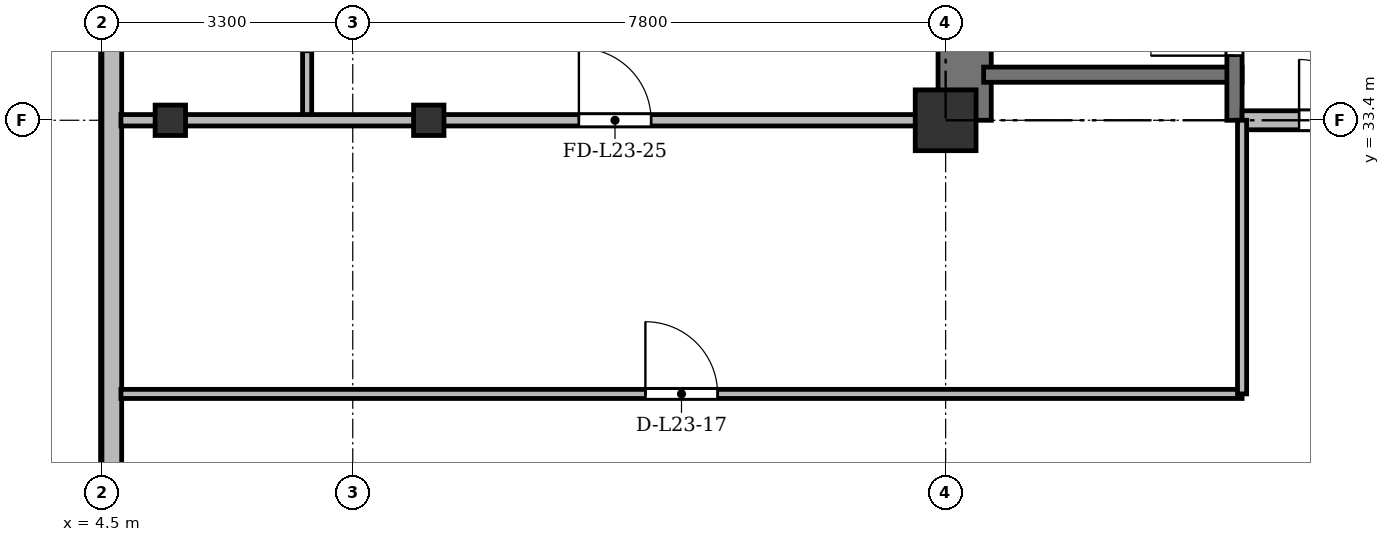
"""IFC4 building model, lengths in metres.
Left out: names, types, materials, properties, quantities, classifications, styles, units other than length and angle.
Written with IfcOpenShell. Run it as: python <this file> out.ifc"""

import sys

from ifc_helpers import new_model, si_unit, direction, frame, frame_2d, origin, origin_2d, place, context, subcontext, project, spatial, rectangle, i_section, extrude, source, transform, mapped, element, fill, save


model = new_model("IFC4")
c1 = context("Model", 3, precision=1e-05, world=origin(), true_north=direction((0.0, 1.0)))
c2 = subcontext(c1, "Body", "Model", "MODEL_VIEW")
j1 = project(units=[si_unit("LENGTHUNIT", "METRE"), si_unit("PLANEANGLEUNIT", "RADIAN")], contexts=[c1])
p1 = place(None, origin())
s1 = spatial("IfcSite", under=j1, at=p1, CompositionType="ELEMENT")
p2 = place(p1, origin())
s2 = spatial("IfcBuilding", under=s1, at=p2, CompositionType="ELEMENT")
p3 = place(p2, frame((0.0, 0.0, 92.5)))
s3 = spatial("IfcBuildingStorey", under=s2, at=p3, CompositionType="ELEMENT", Elevation=92.5)
m1 = source(origin(), c2, "Body", "SweptSolid", [
    extrude(i_section(OverallWidth=0.4, OverallDepth=0.4, WebThickness=0.022, FlangeThickness=0.035, at=origin_2d()), origin(), (0.0, 0.0, 1.0), 3.6),
])
for number, where, z_axis, x_axis in (
    (1, (5.4, 33.4, 0.0), (0.0, 0.0, 1.0), (1.0, 0.0, 0.0)),
    (2, (8.8, 33.4, 0.0), (0.0, 0.0, 1.0), (1.0, 0.0, 0.0)),
):
    element("IfcColumn", number, at=place(p3, frame(where, z_axis=z_axis, x_axis=x_axis)), inside=s3, PredefinedType="COLUMN", context=c2, shape_type="MappedRepresentation", body=[
        mapped(m1, transform((0.0, 0.0, 0.0), x_axis=(1.0, 0.0, 0.0), y_axis=(0.0, 1.0, 0.0), z_axis=(0.0, 0.0, 1.0), scale=1.0)),
    ])
m2 = source(origin(), c2, "Body", "SweptSolid", [
    extrude(rectangle(XDim=0.8, YDim=0.8, at=origin_2d()), origin(), (0.0, 0.0, 1.0), 3.6),
])
p4 = place(p3, frame((15.6, 33.4, 0.0), z_axis=(0.0, 0.0, 1.0), x_axis=(1.0, 0.0, 0.0)))
e3 = element("IfcColumn", 3, at=p4, inside=s3, PredefinedType="COLUMN", context=c2, shape_type="MappedRepresentation", body=[
    mapped(m2, transform((0.0, 0.0, 0.0), x_axis=(1.0, 0.0, 0.0), y_axis=(0.0, 1.0, 0.0), z_axis=(0.0, 0.0, 1.0), scale=1.0)),
])
p5 = place(p3, frame((4.63, 5.9, 0.0), z_axis=(0.0, 0.0, 1.0), x_axis=(0.0, 1.0, 0.0)))
e4 = element("IfcWall", 4, at=p5, inside=s3, PredefinedType="SOLIDWALL", context=c2, shape_type="SweptSolid", body=[
    extrude(rectangle(XDim=39.6, YDim=0.26, at=frame_2d((19.8, 0.0))), origin(), (0.0, 0.0, 1.0), 3.34),
])
p6 = place(p5, frame((1.45, 0.0, 0.92)))
e5 = element("IfcOpeningElement", 5, at=p6, cuts=e4, PredefinedType="OPENING", context=c2, shape_type="SweptSolid", body=[
    extrude(rectangle(XDim=1.2, YDim=1.65, at=frame_2d((0.6, 0.825))), frame((0.0, 0.14, 0.0), z_axis=(0.0, -1.0, 0.0), x_axis=(1.0, 0.0, 0.0)), (0.0, 0.0, 1.0), 0.28),
])
p7 = place(p5, frame((4.3, 0.0, 0.92)))
e6 = element("IfcOpeningElement", 6, at=p7, cuts=e4, PredefinedType="OPENING", context=c2, shape_type="SweptSolid", body=[
    extrude(rectangle(XDim=2.4, YDim=2.1, at=frame_2d((1.2, 1.05))), frame((0.0, 0.14, 0.0), z_axis=(0.0, -1.0, 0.0), x_axis=(1.0, 0.0, 0.0)), (0.0, 0.0, 1.0), 0.28),
])
p8 = place(p5, frame((8.5, 0.0, 0.92)))
e7 = element("IfcOpeningElement", 7, at=p8, cuts=e4, PredefinedType="OPENING", context=c2, shape_type="SweptSolid", body=[
    extrude(rectangle(XDim=2.4, YDim=2.1, at=frame_2d((1.2, 1.05))), frame((0.0, 0.14, 0.0), z_axis=(0.0, -1.0, 0.0), x_axis=(1.0, 0.0, 0.0)), (0.0, 0.0, 1.0), 0.28),
])
p9 = place(p5, frame((33.9, 0.0, 0.92)))
e8 = element("IfcOpeningElement", 8, at=p9, cuts=e4, PredefinedType="OPENING", context=c2, shape_type="SweptSolid", body=[
    extrude(rectangle(XDim=1.2, YDim=1.65, at=frame_2d((0.6, 0.825))), frame((0.0, 0.14, 0.0), z_axis=(0.0, -1.0, 0.0), x_axis=(1.0, 0.0, 0.0)), (0.0, 0.0, 1.0), 0.28),
])
p10 = place(p5, frame((37.25, 0.0, 0.92)))
e9 = element("IfcOpeningElement", 9, at=p10, cuts=e4, PredefinedType="OPENING", context=c2, shape_type="SweptSolid", body=[
    extrude(rectangle(XDim=1.2, YDim=1.65, at=frame_2d((0.6, 0.825))), frame((0.0, 0.14, 0.0), z_axis=(0.0, -1.0, 0.0), x_axis=(1.0, 0.0, 0.0)), (0.0, 0.0, 1.0), 0.28),
])
p11 = place(p3, frame((15.85, 33.4, 0.0), z_axis=(0.0, 0.0, 1.0), x_axis=(0.0, 1.0, 0.0)))
e10 = element("IfcWall", 10, at=p11, inside=s3, PredefinedType="SHEAR", context=c2, shape_type="SweptSolid", body=[
    extrude(rectangle(XDim=11.7, YDim=0.7, at=frame_2d((5.85, 0.0))), origin(), (0.0, 0.0, 1.0), 3.34),
])
p12 = place(p3, frame((16.1, 34.0, 0.0), z_axis=(0.0, 0.0, 1.0), x_axis=(1.0, 0.0, 0.0)))
e11 = element("IfcWall", 11, at=p12, inside=s3, PredefinedType="SHEAR", context=c2, shape_type="SweptSolid", body=[
    extrude(rectangle(XDim=3.4, YDim=0.2, at=frame_2d((1.7, 0.0))), origin(), (0.0, 0.0, 1.0), 3.34),
])
p13 = place(p3, frame((19.4, 33.4, 0.0), z_axis=(0.0, 0.0, 1.0), x_axis=(0.0, 1.0, 0.0)))
e12 = element("IfcWall", 12, at=p13, inside=s3, PredefinedType="SHEAR", context=c2, shape_type="SweptSolid", body=[
    extrude(rectangle(XDim=11.1, YDim=0.2, at=frame_2d((5.55, 0.0))), origin(), (0.0, 0.0, 1.0), 3.34),
])
p14 = place(p13, frame((0.85, 0.0, 0.0)))
e13 = element("IfcOpeningElement", 13, at=p14, cuts=e12, PredefinedType="OPENING", context=c2, shape_type="SweptSolid", body=[
    extrude(rectangle(XDim=1.1, YDim=2.15, at=frame_2d((0.55, 1.075))), frame((0.0, 0.11, 0.0), z_axis=(0.0, -1.0, 0.0), x_axis=(1.0, 0.0, 0.0)), (0.0, 0.0, 1.0), 0.22),
])
p15 = place(p3, frame((19.5, 33.4, 0.0), z_axis=(0.0, 0.0, 1.0), x_axis=(1.0, 0.0, 0.0)))
e14 = element("IfcWall", 14, at=p15, inside=s3, PredefinedType="PARTITIONING", context=c2, shape_type="SweptSolid", body=[
    extrude(rectangle(XDim=6.8, YDim=0.25, at=frame_2d((3.4, 0.0))), origin(), (0.0, 0.0, 1.0), 2.752),
])
p16 = place(p15, frame((0.75, 0.0, 0.0)))
e15 = element("IfcOpeningElement", 15, at=p16, cuts=e14, PredefinedType="OPENING", context=c2, shape_type="SweptSolid", body=[
    extrude(rectangle(XDim=1.6, YDim=2.2, at=frame_2d((0.8, 1.1))), frame((0.0, 0.135, 0.0), z_axis=(0.0, -1.0, 0.0), x_axis=(1.0, 0.0, 0.0)), (0.0, 0.0, 1.0), 0.27),
])
p17 = place(p3, frame((4.75, 29.8, 0.0), z_axis=(0.0, 0.0, 1.0), x_axis=(1.0, 0.0, 0.0)))
e16 = element("IfcWall", 16, at=p17, inside=s3, PredefinedType="PARTITIONING", context=c2, shape_type="SweptSolid", body=[
    extrude(rectangle(XDim=14.75, YDim=0.12, at=frame_2d((7.375, 0.0))), origin(), (0.0, 0.0, 1.0), 2.84),
])
p18 = place(p17, frame((6.9, 0.0, 0.0)))
e17 = element("IfcOpeningElement", 17, at=p18, cuts=e16, PredefinedType="OPENING", context=c2, shape_type="SweptSolid", body=[
    extrude(rectangle(XDim=0.95, YDim=2.15, at=frame_2d((0.475, 1.075))), frame((0.0, 0.07, 0.0), z_axis=(0.0, -1.0, 0.0), x_axis=(1.0, 0.0, 0.0)), (0.0, 0.0, 1.0), 0.14),
])
p19 = place(p3, frame((19.5, 29.8, 0.0), z_axis=(0.0, 0.0, 1.0), x_axis=(0.0, 1.0, 0.0)))
e18 = element("IfcWall", 18, at=p19, inside=s3, PredefinedType="PARTITIONING", context=c2, shape_type="SweptSolid", body=[
    extrude(rectangle(XDim=3.6, YDim=0.12, at=frame_2d((1.8, 0.0))), origin(), (0.0, 0.0, 1.0), 2.752),
])
p20 = place(p3, frame((7.2, 33.4, 0.0), z_axis=(0.0, 0.0, 1.0), x_axis=(0.0, 1.0, 0.0)))
e19 = element("IfcWall", 19, at=p20, inside=s3, PredefinedType="PARTITIONING", context=c2, shape_type="SweptSolid", body=[
    extrude(rectangle(XDim=3.25, YDim=0.12, at=frame_2d((1.625, 0.0))), origin(), (0.0, 0.0, 1.0), 2.752),
])
p21 = place(p20, frame((0.9, 0.0, 0.0)))
e20 = element("IfcOpeningElement", 20, at=p21, cuts=e19, PredefinedType="OPENING", context=c2, shape_type="SweptSolid", body=[
    extrude(rectangle(XDim=0.85, YDim=2.1, at=frame_2d((0.425, 1.05))), frame((0.0, 0.07, 0.0), z_axis=(0.0, -1.0, 0.0), x_axis=(1.0, 0.0, 0.0)), (0.0, 0.0, 1.0), 0.14),
])
p22 = place(p3, frame((4.75, 33.4, 0.0), z_axis=(0.0, 0.0, 1.0), x_axis=(1.0, 0.0, 0.0)))
e21 = element("IfcWall", 21, at=p22, inside=s3, PredefinedType="PARTITIONING", context=c2, shape_type="SweptSolid", body=[
    extrude(rectangle(XDim=10.85, YDim=0.15, at=frame_2d((5.425, 0.0))), origin(), (0.0, 0.0, 1.0), 2.752),
])
p23 = place(p22, frame((6.025, 0.0, 0.0)))
e22 = element("IfcOpeningElement", 22, at=p23, cuts=e21, PredefinedType="OPENING", context=c2, shape_type="SweptSolid", body=[
    extrude(rectangle(XDim=0.95, YDim=2.15, at=frame_2d((0.475, 1.075))), frame((0.0, 0.085, 0.0), z_axis=(0.0, -1.0, 0.0), x_axis=(1.0, 0.0, 0.0)), (0.0, 0.0, 1.0), 0.17),
])
m3 = source(origin(), c2, "Body", "SweptSolid", [
    extrude(rectangle(XDim=1.1, YDim=2.15, at=frame_2d((0.55, 1.075))), frame((0.0, 0.025, 0.0), z_axis=(0.0, -1.0, 0.0), x_axis=(1.0, 0.0, 0.0)), (0.0, 0.0, 1.0), 0.05),
])
p24 = place(p14, origin())
e23 = element("IfcDoor", 23, at=p24, inside=s3, OperationType="SINGLE_SWING_LEFT", PredefinedType="DOOR", context=c2, shape_type="MappedRepresentation", body=[
    mapped(m3, transform((0.0, 0.0, 0.0), x_axis=(1.0, 0.0, 0.0), y_axis=(0.0, 1.0, 0.0), z_axis=(0.0, 0.0, 1.0), scale=1.0)),
])
fill(e13, e23)
m4 = source(origin(), c2, "Body", "SweptSolid", [
    extrude(rectangle(XDim=1.6, YDim=2.2, at=frame_2d((0.8, 1.1))), frame((0.0, 0.025, 0.0), z_axis=(0.0, -1.0, 0.0), x_axis=(1.0, 0.0, 0.0)), (0.0, 0.0, 1.0), 0.05),
])
p25 = place(p16, origin())
e24 = element("IfcDoor", 24, at=p25, inside=s3, OperationType="DOUBLE_DOOR_SINGLE_SWING", PredefinedType="DOOR", context=c2, shape_type="MappedRepresentation", body=[
    mapped(m4, transform((0.0, 0.0, 0.0), x_axis=(1.0, 0.0, 0.0), y_axis=(0.0, 1.0, 0.0), z_axis=(0.0, 0.0, 1.0), scale=1.0)),
])
fill(e15, e24)
m5 = source(origin(), c2, "Body", "SweptSolid", [
    extrude(rectangle(XDim=0.95, YDim=2.15, at=frame_2d((0.475, 1.075))), frame((0.0, 0.025, 0.0), z_axis=(0.0, -1.0, 0.0), x_axis=(1.0, 0.0, 0.0)), (0.0, 0.0, 1.0), 0.05),
])
p26 = place(p18, origin())
e25 = element("IfcDoor", 25, at=p26, inside=s3, OperationType="SINGLE_SWING_LEFT", PredefinedType="DOOR", context=c2, shape_type="MappedRepresentation", body=[
    mapped(m5, transform((0.0, 0.0, 0.0), x_axis=(1.0, 0.0, 0.0), y_axis=(0.0, 1.0, 0.0), z_axis=(0.0, 0.0, 1.0), scale=1.0)),
])
fill(e17, e25)
m6 = source(origin(), c2, "Body", "SweptSolid", [
    extrude(rectangle(XDim=0.85, YDim=2.1, at=frame_2d((0.425, 1.05))), frame((0.0, 0.025, 0.0), z_axis=(0.0, -1.0, 0.0), x_axis=(1.0, 0.0, 0.0)), (0.0, 0.0, 1.0), 0.05),
])
p27 = place(p21, origin())
e26 = element("IfcDoor", 26, at=p27, inside=s3, OperationType="SINGLE_SWING_RIGHT", PredefinedType="DOOR", context=c2, shape_type="MappedRepresentation", body=[
    mapped(m6, transform((0.0, 0.0, 0.0), x_axis=(1.0, 0.0, 0.0), y_axis=(0.0, 1.0, 0.0), z_axis=(0.0, 0.0, 1.0), scale=1.0)),
])
fill(e20, e26)
p28 = place(p23, origin())
e27 = element("IfcDoor", 27, at=p28, inside=s3, OperationType="SINGLE_SWING_LEFT", PredefinedType="DOOR", context=c2, shape_type="MappedRepresentation", body=[
    mapped(m5, transform((0.0, 0.0, 0.0), x_axis=(1.0, 0.0, 0.0), y_axis=(0.0, 1.0, 0.0), z_axis=(0.0, 0.0, 1.0), scale=1.0)),
])
fill(e22, e27)
save(model, sys.argv[1])
